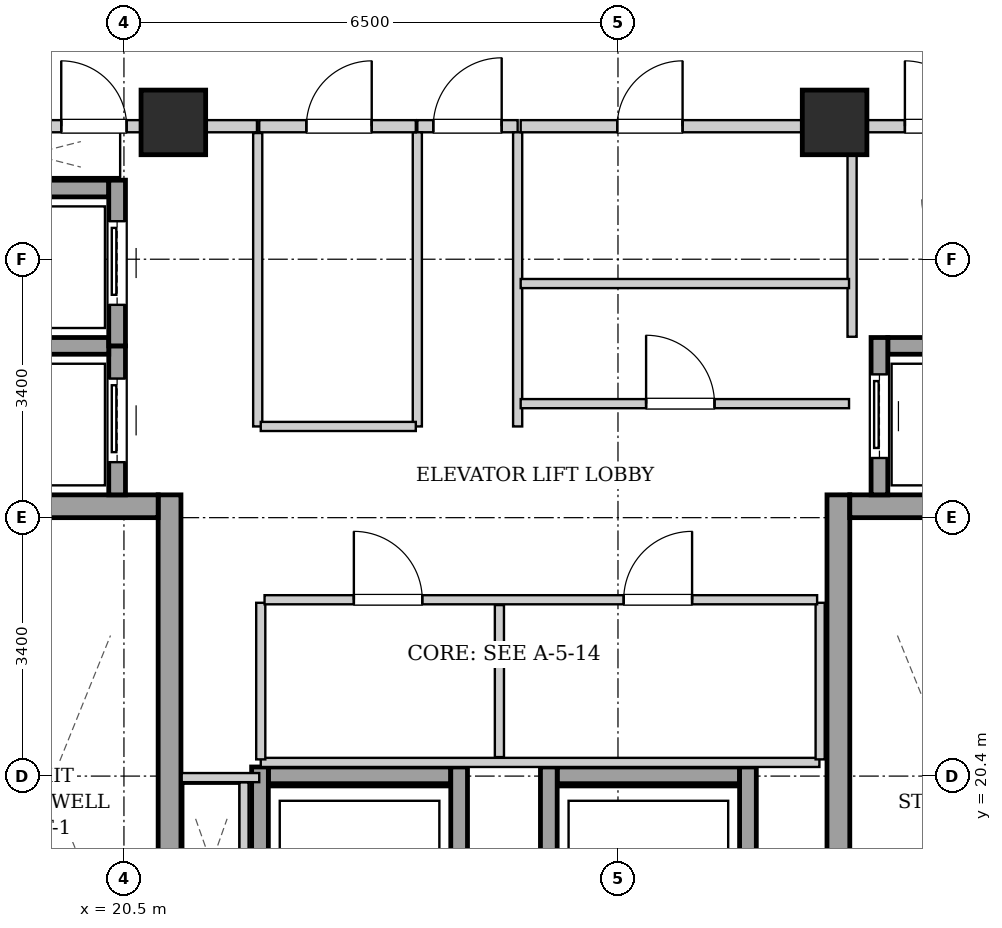
"""IFC4 building model, lengths in metres.
Left out: names, types, materials, properties, quantities, classifications, styles, units other than length and angle.
Written with IfcOpenShell. Run it as: python <this file> out.ifc"""

import sys

from ifc_helpers import new_model, si_unit, direction, frame, frame_2d, origin, origin_2d, place, context, subcontext, project, spatial, rectangle, extrude, element, fill, save


model = new_model("IFC4")
c1 = context("Model", 3, precision=1e-05, world=origin(), true_north=direction((0.0, 1.0)))
c2 = subcontext(c1, "Body", "Model", "MODEL_VIEW")
j1 = project(units=[si_unit("LENGTHUNIT", "METRE"), si_unit("PLANEANGLEUNIT", "RADIAN")], contexts=[c1])
p1 = place(None, origin())
s1 = spatial("IfcSite", under=j1, at=p1, CompositionType="ELEMENT")
p2 = place(p1, origin())
s2 = spatial("IfcBuilding", under=s1, at=p2, CompositionType="ELEMENT")
p3 = place(p2, frame((0.0, 0.0, 194.2)))
s3 = spatial("IfcBuildingStorey", under=s2, at=p3, CompositionType="ELEMENT", Elevation=194.2)
for number, where, z_axis, x_axis in (
    (1, (21.15, 29.0, 0.0), (0.0, 0.0, 1.0), (1.0, 0.0, 0.0)),
    (2, (29.85, 29.0, 0.0), (0.0, 0.0, 1.0), (1.0, 0.0, 0.0)),
):
    element("IfcColumn", number, at=place(p3, frame(where, z_axis=z_axis, x_axis=x_axis)), inside=s3, PredefinedType="COLUMN", context=c2, shape_type="SweptSolid", body=[
        extrude(rectangle(XDim=0.85, YDim=0.85, at=origin_2d()), origin(), (0.0, 0.0, 1.0), 3.3),
    ])
p4 = place(p3, frame((21.1, 15.1, 0.0), z_axis=(0.0, 0.0, 1.0), x_axis=(0.0, 1.0, 0.0)))
e3 = element("IfcWall", 3, at=p4, inside=s3, PredefinedType="SHEAR", context=c2, shape_type="SweptSolid", body=[
    extrude(rectangle(XDim=9.0, YDim=0.3, at=frame_2d((4.5, 0.0))), origin(), (0.0, 0.0, 1.0), 3.04),
])
p5 = place(p3, frame((18.1, 23.95, 0.0), z_axis=(0.0, 0.0, 1.0), x_axis=(1.0, 0.0, 0.0)))
e4 = element("IfcWall", 4, at=p5, inside=s3, PredefinedType="SHEAR", context=c2, shape_type="SweptSolid", body=[
    extrude(rectangle(XDim=2.85, YDim=0.3, at=frame_2d((1.425, 0.0))), origin(), (0.0, 0.0, 1.0), 3.04),
])
p6 = place(p3, frame((29.9, 15.1, 0.0), z_axis=(0.0, 0.0, 1.0), x_axis=(0.0, 1.0, 0.0)))
e5 = element("IfcWall", 5, at=p6, inside=s3, PredefinedType="SHEAR", context=c2, shape_type="SweptSolid", body=[
    extrude(rectangle(XDim=9.0, YDim=0.3, at=frame_2d((4.5, 0.0))), origin(), (0.0, 0.0, 1.0), 3.04),
])
p7 = place(p3, frame((30.05, 23.95, 0.0), z_axis=(0.0, 0.0, 1.0), x_axis=(1.0, 0.0, 0.0)))
e6 = element("IfcWall", 6, at=p7, inside=s3, PredefinedType="SHEAR", context=c2, shape_type="SweptSolid", body=[
    extrude(rectangle(XDim=2.85, YDim=0.3, at=frame_2d((1.425, 0.0))), origin(), (0.0, 0.0, 1.0), 3.04),
])
p8 = place(p3, frame((20.41, 24.1, 0.0), z_axis=(0.0, 0.0, 1.0), x_axis=(0.0, 1.0, 0.0)))
e7 = element("IfcWall", 7, at=p8, inside=s3, PredefinedType="SHEAR", context=c2, shape_type="SweptSolid", body=[
    extrude(rectangle(XDim=1.96, YDim=0.22, at=frame_2d((0.98, 0.0))), origin(), (0.0, 0.0, 1.0), 3.04),
])
p9 = place(p8, frame((0.43, 0.0, 0.0)))
e8 = element("IfcOpeningElement", 8, at=p9, cuts=e7, PredefinedType="OPENING", context=c2, shape_type="SweptSolid", body=[
    extrude(rectangle(XDim=1.1, YDim=2.15, at=frame_2d((0.55, 1.075))), frame((0.0, 0.12, 0.0), z_axis=(0.0, -1.0, 0.0), x_axis=(1.0, 0.0, 0.0)), (0.0, 0.0, 1.0), 0.24),
])
for number, where, z_axis, x_axis in (
    (9, (18.4, 26.06, 0.0), (0.0, 0.0, 1.0), (1.0, 0.0, 0.0)),
    (10, (18.4, 28.13, 0.0), (0.0, 0.0, 1.0), (1.0, 0.0, 0.0)),
):
    element("IfcWall", number, at=place(p3, frame(where, z_axis=z_axis, x_axis=x_axis)), inside=s3, PredefinedType="SHEAR", context=c2, shape_type="SweptSolid", body=[
        extrude(rectangle(XDim=1.9, YDim=0.22, at=frame_2d((0.95, 0.0))), origin(), (0.0, 0.0, 1.0), 3.04),
    ])
p10 = place(p3, frame((20.41, 26.06, 0.0), z_axis=(0.0, 0.0, 1.0), x_axis=(0.0, 1.0, 0.0)))
e11 = element("IfcWall", 11, at=p10, inside=s3, PredefinedType="SHEAR", context=c2, shape_type="SweptSolid", body=[
    extrude(rectangle(XDim=2.18, YDim=0.22, at=frame_2d((1.09, 0.0))), origin(), (0.0, 0.0, 1.0), 3.04),
])
p11 = place(p10, frame((0.54, 0.0, 0.0)))
e12 = element("IfcOpeningElement", 12, at=p11, cuts=e11, PredefinedType="OPENING", context=c2, shape_type="SweptSolid", body=[
    extrude(rectangle(XDim=1.1, YDim=2.15, at=frame_2d((0.55, 1.075))), frame((0.0, 0.12, 0.0), z_axis=(0.0, -1.0, 0.0), x_axis=(1.0, 0.0, 0.0)), (0.0, 0.0, 1.0), 0.24),
])
p12 = place(p3, frame((30.55, 26.06, 0.0), z_axis=(0.0, 0.0, 1.0), x_axis=(1.0, 0.0, 0.0)))
e13 = element("IfcWall", 13, at=p12, inside=s3, PredefinedType="SHEAR", context=c2, shape_type="SweptSolid", body=[
    extrude(rectangle(XDim=1.9, YDim=0.22, at=frame_2d((0.95, 0.0))), origin(), (0.0, 0.0, 1.0), 3.04),
])
p13 = place(p3, frame((30.44, 24.1, 0.0), z_axis=(0.0, 0.0, 1.0), x_axis=(0.0, 1.0, 0.0)))
e14 = element("IfcWall", 14, at=p13, inside=s3, PredefinedType="SHEAR", context=c2, shape_type="SweptSolid", body=[
    extrude(rectangle(XDim=2.07, YDim=0.22, at=frame_2d((1.035, 0.0))), origin(), (0.0, 0.0, 1.0), 3.04),
])
p14 = place(p13, frame((0.485, 0.0, 0.0)))
e15 = element("IfcOpeningElement", 15, at=p14, cuts=e14, PredefinedType="OPENING", context=c2, shape_type="SweptSolid", body=[
    extrude(rectangle(XDim=1.1, YDim=2.15, at=frame_2d((0.55, 1.075))), frame((0.0, 0.12, 0.0), z_axis=(0.0, -1.0, 0.0), x_axis=(1.0, 0.0, 0.0)), (0.0, 0.0, 1.0), 0.24),
])
p15 = place(p3, frame((22.4, 20.41, 0.0), z_axis=(0.0, 0.0, 1.0), x_axis=(1.0, 0.0, 0.0)))
e16 = element("IfcWall", 16, at=p15, inside=s3, PredefinedType="SHEAR", context=c2, shape_type="SweptSolid", body=[
    extrude(rectangle(XDim=2.4, YDim=0.22, at=frame_2d((1.2, 0.0))), origin(), (0.0, 0.0, 1.0), 3.04),
])
for number, where, z_axis, x_axis in (
    (17, (22.29, 17.98, 0.0), (0.0, 0.0, 1.0), (0.0, 1.0, 0.0)),
    (18, (24.91, 17.98, 0.0), (0.0, 0.0, 1.0), (0.0, 1.0, 0.0)),
):
    element("IfcWall", number, at=place(p3, frame(where, z_axis=z_axis, x_axis=x_axis)), inside=s3, PredefinedType="SHEAR", context=c2, shape_type="SweptSolid", body=[
        extrude(rectangle(XDim=2.54, YDim=0.22, at=frame_2d((1.27, 0.0))), origin(), (0.0, 0.0, 1.0), 3.04),
    ])
p16 = place(p3, frame((26.2, 20.41, 0.0), z_axis=(0.0, 0.0, 1.0), x_axis=(1.0, 0.0, 0.0)))
e19 = element("IfcWall", 19, at=p16, inside=s3, PredefinedType="SHEAR", context=c2, shape_type="SweptSolid", body=[
    extrude(rectangle(XDim=2.4, YDim=0.22, at=frame_2d((1.2, 0.0))), origin(), (0.0, 0.0, 1.0), 3.04),
])
for number, where, z_axis, x_axis in (
    (20, (26.09, 17.98, 0.0), (0.0, 0.0, 1.0), (0.0, 1.0, 0.0)),
    (21, (28.71, 17.98, 0.0), (0.0, 0.0, 1.0), (0.0, 1.0, 0.0)),
):
    element("IfcWall", number, at=place(p3, frame(where, z_axis=z_axis, x_axis=x_axis)), inside=s3, PredefinedType="SHEAR", context=c2, shape_type="SweptSolid", body=[
        extrude(rectangle(XDim=2.54, YDim=0.22, at=frame_2d((1.27, 0.0))), origin(), (0.0, 0.0, 1.0), 3.04),
    ])
p17 = place(p3, frame((24.36, 28.95, 0.0), z_axis=(0.0, 0.0, 1.0), x_axis=(1.0, 0.0, 0.0)))
e22 = element("IfcWall", 22, at=p17, inside=s3, PredefinedType="PARTITIONING", context=c2, shape_type="SweptSolid", body=[
    extrude(rectangle(XDim=1.32, YDim=0.16, at=frame_2d((0.66, 0.0))), origin(), (0.0, 0.0, 1.0), 2.556),
])
p18 = place(p17, frame((0.21, 0.0, 0.0)))
e23 = element("IfcOpeningElement", 23, at=p18, cuts=e22, PredefinedType="OPENING", context=c2, shape_type="SweptSolid", body=[
    extrude(rectangle(XDim=0.9, YDim=2.05, at=frame_2d((0.45, 1.025))), frame((0.0, 0.09, 0.0), z_axis=(0.0, -1.0, 0.0), x_axis=(1.0, 0.0, 0.0)), (0.0, 0.0, 1.0), 0.18),
])
p19 = place(p3, frame((17.96, 28.95, 0.0), z_axis=(0.0, 0.0, 1.0), x_axis=(1.0, 0.0, 0.0)))
e24 = element("IfcWall", 24, at=p19, inside=s3, PredefinedType="PARTITIONING", context=c2, shape_type="SweptSolid", body=[
    extrude(rectangle(XDim=4.29, YDim=0.16, at=frame_2d((2.145, 0.0))), origin(), (0.0, 0.0, 1.0), 2.556),
])
p20 = place(p19, frame((1.715, 0.0, 0.0)))
e25 = element("IfcOpeningElement", 25, at=p20, cuts=e24, PredefinedType="OPENING", context=c2, shape_type="SweptSolid", body=[
    extrude(rectangle(XDim=0.86, YDim=2.05, at=frame_2d((0.43, 1.025))), frame((0.0, 0.09, 0.0), z_axis=(0.0, -1.0, 0.0), x_axis=(1.0, 0.0, 0.0)), (0.0, 0.0, 1.0), 0.18),
])
p21 = place(p3, frame((22.08, 18.2, 0.0), z_axis=(0.0, 0.0, 1.0), x_axis=(0.0, 1.0, 0.0)))
e26 = element("IfcWall", 26, at=p21, inside=s3, PredefinedType="PARTITIONING", context=c2, shape_type="SweptSolid", body=[
    extrude(rectangle(XDim=2.12, YDim=0.12, at=frame_2d((1.06, 0.0))), origin(), (0.0, 0.0, 1.0), 3.04),
])
p22 = place(p3, frame((22.28, 20.38, 0.0), z_axis=(0.0, 0.0, 1.0), x_axis=(-1.0, 0.0, 0.0)))
e27 = element("IfcWall", 27, at=p22, inside=s3, PredefinedType="PARTITIONING", context=c2, shape_type="SweptSolid", body=[
    extrude(rectangle(XDim=1.02, YDim=0.12, at=frame_2d((0.51, 0.0))), origin(), (0.0, 0.0, 1.0), 3.04),
])
for number, where, z_axis, x_axis in (
    (28, (24.36, 25.0, 0.0), (0.0, 0.0, 1.0), (0.0, 1.0, 0.0)),
    (29, (25.68, 25.0, 0.0), (0.0, 0.0, 1.0), (0.0, 1.0, 0.0)),
):
    element("IfcWall", number, at=place(p3, frame(where, z_axis=z_axis, x_axis=x_axis)), inside=s3, PredefinedType="PARTITIONING", context=c2, shape_type="SweptSolid", body=[
        extrude(rectangle(XDim=3.87, YDim=0.12, at=frame_2d((1.935, 0.0))), origin(), (0.0, 0.0, 1.0), 3.04),
    ])
p23 = place(p3, frame((30.08, 26.18, 0.0), z_axis=(0.0, 0.0, 1.0), x_axis=(0.0, 1.0, 0.0)))
e30 = element("IfcWall", 30, at=p23, inside=s3, PredefinedType="PARTITIONING", context=c2, shape_type="SweptSolid", body=[
    extrude(rectangle(XDim=2.68, YDim=0.12, at=frame_2d((1.34, 0.0))), origin(), (0.0, 0.0, 1.0), 3.04),
])
p24 = place(p3, frame((30.08, 28.95, 0.0), z_axis=(0.0, 0.0, 1.0), x_axis=(1.0, 0.0, 0.0)))
e31 = element("IfcWall", 31, at=p24, inside=s3, PredefinedType="PARTITIONING", context=c2, shape_type="SweptSolid", body=[
    extrude(rectangle(XDim=2.96, YDim=0.16, at=frame_2d((1.48, 0.0))), origin(), (0.0, 0.0, 1.0), 3.04),
])
p25 = place(p24, frame((0.695, 0.0, 0.0)))
e32 = element("IfcOpeningElement", 32, at=p25, cuts=e31, PredefinedType="OPENING", context=c2, shape_type="SweptSolid", body=[
    extrude(rectangle(XDim=0.86, YDim=2.05, at=frame_2d((0.43, 1.025))), frame((0.0, 0.09, 0.0), z_axis=(0.0, -1.0, 0.0), x_axis=(1.0, 0.0, 0.0)), (0.0, 0.0, 1.0), 0.18),
])
p26 = place(p3, frame((22.26, 25.0, 0.0), z_axis=(0.0, 0.0, 1.0), x_axis=(0.0, 1.0, 0.0)))
e33 = element("IfcWall", 33, at=p26, inside=s3, PredefinedType="PARTITIONING", context=c2, shape_type="SweptSolid", body=[
    extrude(rectangle(XDim=3.86, YDim=0.12, at=frame_2d((1.93, 0.0))), origin(), (0.0, 0.0, 1.0), 3.04),
])
p27 = place(p3, frame((22.3, 25.0, 0.0), z_axis=(0.0, 0.0, 1.0), x_axis=(1.0, 0.0, 0.0)))
e34 = element("IfcWall", 34, at=p27, inside=s3, PredefinedType="PARTITIONING", context=c2, shape_type="SweptSolid", body=[
    extrude(rectangle(XDim=2.04, YDim=0.12, at=frame_2d((1.02, 0.0))), origin(), (0.0, 0.0, 1.0), 3.04),
])
p28 = place(p3, frame((22.28, 28.95, 0.0), z_axis=(0.0, 0.0, 1.0), x_axis=(1.0, 0.0, 0.0)))
e35 = element("IfcWall", 35, at=p28, inside=s3, PredefinedType="PARTITIONING", context=c2, shape_type="SweptSolid", body=[
    extrude(rectangle(XDim=2.06, YDim=0.16, at=frame_2d((1.03, 0.0))), origin(), (0.0, 0.0, 1.0), 2.556),
])
p29 = place(p28, frame((0.62, 0.0, 0.0)))
e36 = element("IfcOpeningElement", 36, at=p29, cuts=e35, PredefinedType="OPENING", context=c2, shape_type="SweptSolid", body=[
    extrude(rectangle(XDim=0.86, YDim=2.05, at=frame_2d((0.43, 1.025))), frame((0.0, 0.09, 0.0), z_axis=(0.0, -1.0, 0.0), x_axis=(1.0, 0.0, 0.0)), (0.0, 0.0, 1.0), 0.18),
])
p30 = place(p3, frame((25.72, 26.88, 0.0), z_axis=(0.0, 0.0, 1.0), x_axis=(1.0, 0.0, 0.0)))
e37 = element("IfcWall", 37, at=p30, inside=s3, PredefinedType="PARTITIONING", context=c2, shape_type="SweptSolid", body=[
    extrude(rectangle(XDim=4.32, YDim=0.12, at=frame_2d((2.16, 0.0))), origin(), (0.0, 0.0, 1.0), 3.04),
])
p31 = place(p3, frame((25.72, 25.3, 0.0), z_axis=(0.0, 0.0, 1.0), x_axis=(1.0, 0.0, 0.0)))
e38 = element("IfcWall", 38, at=p31, inside=s3, PredefinedType="PARTITIONING", context=c2, shape_type="SweptSolid", body=[
    extrude(rectangle(XDim=4.32, YDim=0.12, at=frame_2d((2.16, 0.0))), origin(), (0.0, 0.0, 1.0), 3.04),
])
p32 = place(p31, frame((1.65, 0.0, 0.0)))
e39 = element("IfcOpeningElement", 39, at=p32, cuts=e38, PredefinedType="OPENING", context=c2, shape_type="SweptSolid", body=[
    extrude(rectangle(XDim=0.9, YDim=2.05, at=frame_2d((0.45, 1.025))), frame((0.0, 0.07, 0.0), z_axis=(0.0, -1.0, 0.0), x_axis=(1.0, 0.0, 0.0)), (0.0, 0.0, 1.0), 0.14),
])
p33 = place(p3, frame((25.72, 28.95, 0.0), z_axis=(0.0, 0.0, 1.0), x_axis=(1.0, 0.0, 0.0)))
e40 = element("IfcWall", 40, at=p33, inside=s3, PredefinedType="PARTITIONING", context=c2, shape_type="SweptSolid", body=[
    extrude(rectangle(XDim=4.32, YDim=0.16, at=frame_2d((2.16, 0.0))), origin(), (0.0, 0.0, 1.0), 2.556),
])
p34 = place(p33, frame((1.27, 0.0, 0.0)))
e41 = element("IfcOpeningElement", 41, at=p34, cuts=e40, PredefinedType="OPENING", context=c2, shape_type="SweptSolid", body=[
    extrude(rectangle(XDim=0.86, YDim=2.05, at=frame_2d((0.43, 1.025))), frame((0.0, 0.09, 0.0), z_axis=(0.0, -1.0, 0.0), x_axis=(1.0, 0.0, 0.0)), (0.0, 0.0, 1.0), 0.18),
])
p35 = place(p3, frame((22.3, 20.58, 0.0), z_axis=(0.0, 0.0, 1.0), x_axis=(1.0, 0.0, 0.0)))
e42 = element("IfcWall", 42, at=p35, inside=s3, PredefinedType="PARTITIONING", context=c2, shape_type="SweptSolid", body=[
    extrude(rectangle(XDim=7.35, YDim=0.12, at=frame_2d((3.675, 0.0))), origin(), (0.0, 0.0, 1.0), 3.04),
])
for number, where, z_axis, x_axis in (
    (43, (22.3, 20.62, 0.0), (0.0, 0.0, 1.0), (0.0, 1.0, 0.0)),
    (44, (29.66, 20.62, 0.0), (0.0, 0.0, 1.0), (0.0, 1.0, 0.0)),
):
    element("IfcWall", number, at=place(p3, frame(where, z_axis=z_axis, x_axis=x_axis)), inside=s3, PredefinedType="PARTITIONING", context=c2, shape_type="SweptSolid", body=[
        extrude(rectangle(XDim=2.06, YDim=0.12, at=frame_2d((1.03, 0.0))), origin(), (0.0, 0.0, 1.0), 3.04),
    ])
p36 = place(p3, frame((25.44, 20.65, 0.0), z_axis=(0.0, 0.0, 1.0), x_axis=(0.0, 1.0, 0.0)))
e45 = element("IfcWall", 45, at=p36, inside=s3, PredefinedType="PARTITIONING", context=c2, shape_type="SweptSolid", body=[
    extrude(rectangle(XDim=2.0, YDim=0.12, at=frame_2d((1.0, 0.0))), origin(), (0.0, 0.0, 1.0), 3.04),
])
p37 = place(p3, frame((22.35, 22.72, 0.0), z_axis=(0.0, 0.0, 1.0), x_axis=(1.0, 0.0, 0.0)))
e46 = element("IfcWall", 46, at=p37, inside=s3, PredefinedType="PARTITIONING", context=c2, shape_type="SweptSolid", body=[
    extrude(rectangle(XDim=7.27, YDim=0.12, at=frame_2d((3.635, 0.0))), origin(), (0.0, 0.0, 1.0), 3.04),
])
p38 = place(p37, frame((1.175, 0.0, 0.0)))
e47 = element("IfcOpeningElement", 47, at=p38, cuts=e46, PredefinedType="OPENING", context=c2, shape_type="SweptSolid", body=[
    extrude(rectangle(XDim=0.9, YDim=2.05, at=frame_2d((0.45, 1.025))), frame((0.0, 0.07, 0.0), z_axis=(0.0, -1.0, 0.0), x_axis=(1.0, 0.0, 0.0)), (0.0, 0.0, 1.0), 0.14),
])
p39 = place(p37, frame((4.725, 0.0, 0.0)))
e48 = element("IfcOpeningElement", 48, at=p39, cuts=e46, PredefinedType="OPENING", context=c2, shape_type="SweptSolid", body=[
    extrude(rectangle(XDim=0.9, YDim=2.05, at=frame_2d((0.45, 1.025))), frame((0.0, 0.07, 0.0), z_axis=(0.0, -1.0, 0.0), x_axis=(1.0, 0.0, 0.0)), (0.0, 0.0, 1.0), 0.14),
])
p40 = place(p9, origin())
e49 = element("IfcDoor", 49, at=p40, inside=s3, OperationType="SLIDING_TO_LEFT", PredefinedType="DOOR", context=c2, shape_type="SweptSolid", body=[
    extrude(rectangle(XDim=1.1, YDim=2.15, at=frame_2d((0.55, 1.075))), frame((0.0, 0.025, 0.0), z_axis=(0.0, -1.0, 0.0), x_axis=(1.0, 0.0, 0.0)), (0.0, 0.0, 1.0), 0.05),
])
fill(e8, e49)
p41 = place(p11, origin())
e50 = element("IfcDoor", 50, at=p41, inside=s3, OperationType="SLIDING_TO_LEFT", PredefinedType="DOOR", context=c2, shape_type="SweptSolid", body=[
    extrude(rectangle(XDim=1.1, YDim=2.15, at=frame_2d((0.55, 1.075))), frame((0.0, 0.025, 0.0), z_axis=(0.0, -1.0, 0.0), x_axis=(1.0, 0.0, 0.0)), (0.0, 0.0, 1.0), 0.05),
])
fill(e12, e50)
p42 = place(p14, origin())
e51 = element("IfcDoor", 51, at=p42, inside=s3, OperationType="SLIDING_TO_LEFT", PredefinedType="DOOR", context=c2, shape_type="SweptSolid", body=[
    extrude(rectangle(XDim=1.1, YDim=2.15, at=frame_2d((0.55, 1.075))), frame((0.0, 0.025, 0.0), z_axis=(0.0, -1.0, 0.0), x_axis=(1.0, 0.0, 0.0)), (0.0, 0.0, 1.0), 0.05),
])
fill(e15, e51)
p43 = place(p18, origin())
e52 = element("IfcDoor", 52, at=p43, inside=s3, OperationType="SINGLE_SWING_RIGHT", PredefinedType="DOOR", context=c2, shape_type="SweptSolid", body=[
    extrude(rectangle(XDim=0.9, YDim=2.05, at=frame_2d((0.45, 1.025))), frame((0.0, 0.025, 0.0), z_axis=(0.0, -1.0, 0.0), x_axis=(1.0, 0.0, 0.0)), (0.0, 0.0, 1.0), 0.05),
])
fill(e23, e52)
p44 = place(p20, origin())
e53 = element("IfcDoor", 53, at=p44, inside=s3, OperationType="SINGLE_SWING_LEFT", PredefinedType="DOOR", context=c2, shape_type="SweptSolid", body=[
    extrude(rectangle(XDim=0.86, YDim=2.05, at=frame_2d((0.43, 1.025))), frame((0.0, 0.025, 0.0), z_axis=(0.0, -1.0, 0.0), x_axis=(1.0, 0.0, 0.0)), (0.0, 0.0, 1.0), 0.05),
])
fill(e25, e53)
p45 = place(p25, origin())
e54 = element("IfcDoor", 54, at=p45, inside=s3, OperationType="SINGLE_SWING_LEFT", PredefinedType="DOOR", context=c2, shape_type="SweptSolid", body=[
    extrude(rectangle(XDim=0.86, YDim=2.05, at=frame_2d((0.43, 1.025))), frame((0.0, 0.025, 0.0), z_axis=(0.0, -1.0, 0.0), x_axis=(1.0, 0.0, 0.0)), (0.0, 0.0, 1.0), 0.05),
])
fill(e32, e54)
p46 = place(p29, origin())
e55 = element("IfcDoor", 55, at=p46, inside=s3, OperationType="SINGLE_SWING_RIGHT", PredefinedType="DOOR", context=c2, shape_type="SweptSolid", body=[
    extrude(rectangle(XDim=0.86, YDim=2.05, at=frame_2d((0.43, 1.025))), frame((0.0, 0.025, 0.0), z_axis=(0.0, -1.0, 0.0), x_axis=(1.0, 0.0, 0.0)), (0.0, 0.0, 1.0), 0.05),
])
fill(e36, e55)
p47 = place(p32, origin())
e56 = element("IfcDoor", 56, at=p47, inside=s3, OperationType="SINGLE_SWING_LEFT", PredefinedType="DOOR", context=c2, shape_type="SweptSolid", body=[
    extrude(rectangle(XDim=0.9, YDim=2.05, at=frame_2d((0.45, 1.025))), frame((0.0, 0.025, 0.0), z_axis=(0.0, -1.0, 0.0), x_axis=(1.0, 0.0, 0.0)), (0.0, 0.0, 1.0), 0.05),
])
fill(e39, e56)
p48 = place(p34, origin())
e57 = element("IfcDoor", 57, at=p48, inside=s3, OperationType="SINGLE_SWING_RIGHT", PredefinedType="DOOR", context=c2, shape_type="SweptSolid", body=[
    extrude(rectangle(XDim=0.86, YDim=2.05, at=frame_2d((0.43, 1.025))), frame((0.0, 0.025, 0.0), z_axis=(0.0, -1.0, 0.0), x_axis=(1.0, 0.0, 0.0)), (0.0, 0.0, 1.0), 0.05),
])
fill(e41, e57)
p49 = place(p38, origin())
e58 = element("IfcDoor", 58, at=p49, inside=s3, OperationType="SINGLE_SWING_LEFT", PredefinedType="DOOR", context=c2, shape_type="SweptSolid", body=[
    extrude(rectangle(XDim=0.9, YDim=2.05, at=frame_2d((0.45, 1.025))), frame((0.0, 0.025, 0.0), z_axis=(0.0, -1.0, 0.0), x_axis=(1.0, 0.0, 0.0)), (0.0, 0.0, 1.0), 0.05),
])
fill(e47, e58)
p50 = place(p39, origin())
e59 = element("IfcDoor", 59, at=p50, inside=s3, OperationType="SINGLE_SWING_RIGHT", PredefinedType="DOOR", context=c2, shape_type="SweptSolid", body=[
    extrude(rectangle(XDim=0.9, YDim=2.05, at=frame_2d((0.45, 1.025))), frame((0.0, 0.025, 0.0), z_axis=(0.0, -1.0, 0.0), x_axis=(1.0, 0.0, 0.0)), (0.0, 0.0, 1.0), 0.05),
])
fill(e48, e59)
save(model, sys.argv[1])
